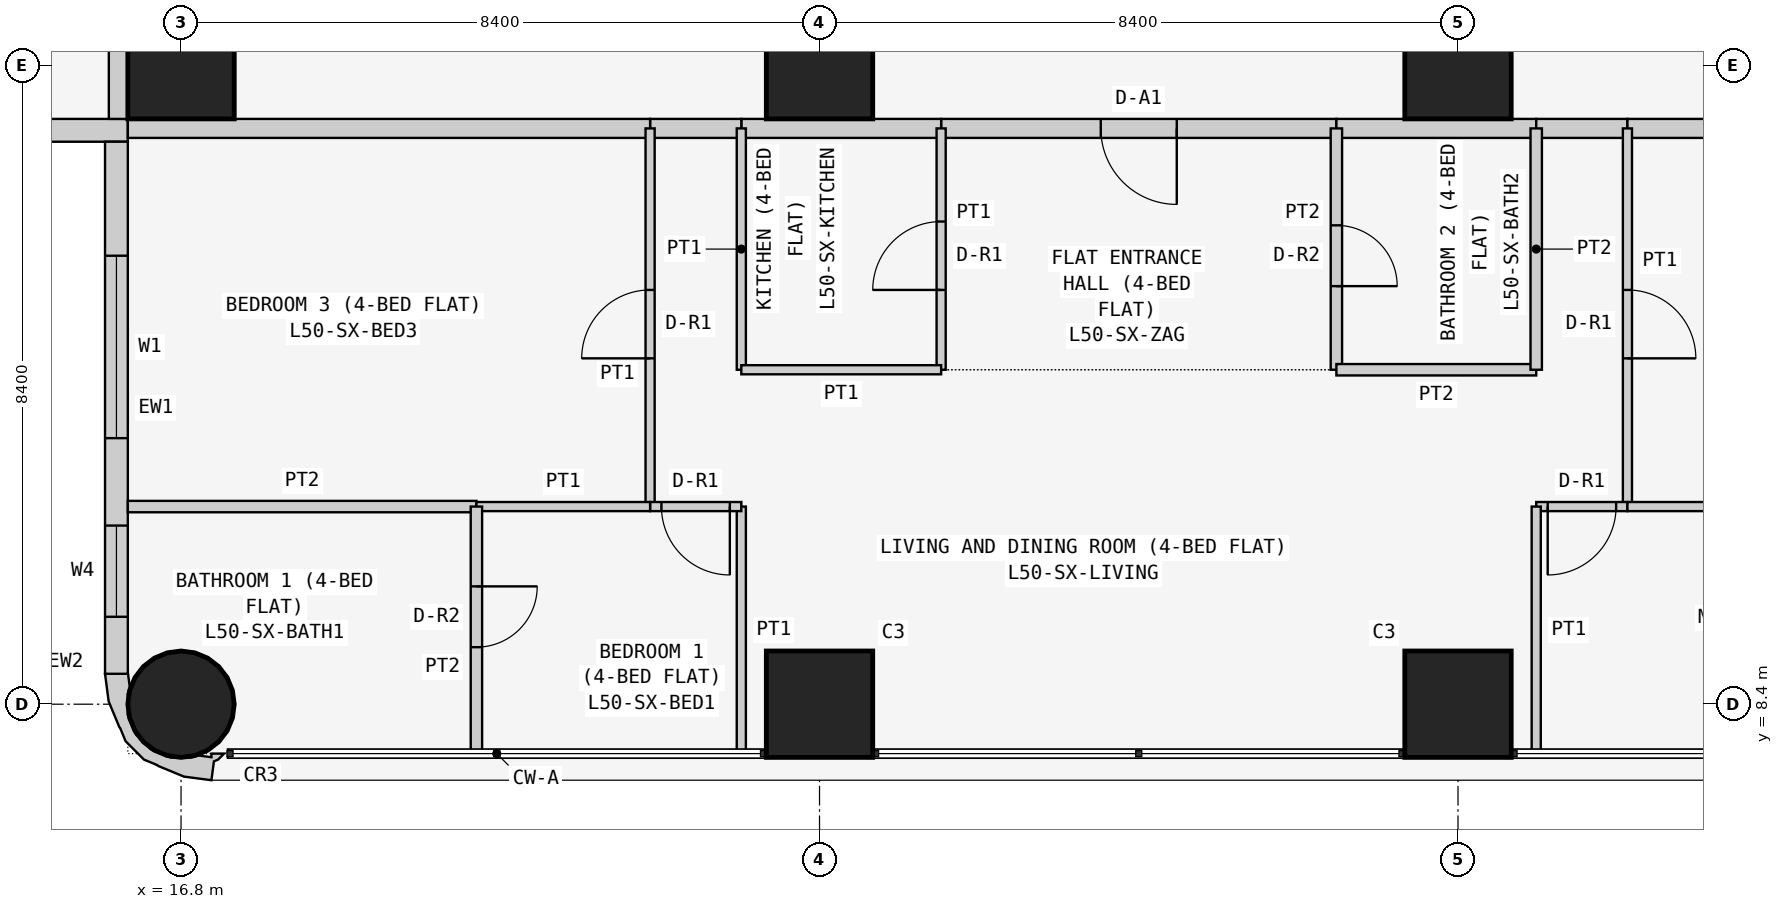
"""IFC4 building model, lengths in metres.
Left out: names, types, materials, properties, quantities, classifications, styles, units other than length and angle.
Written with IfcOpenShell. Run it as: python <this file> out.ifc"""

import sys

from ifc_helpers import new_model, si_unit, direction, frame, frame_2d, origin, origin_2d, place, context, subcontext, project, spatial, polyline, rectangle, circle, outline, extrude, element, fill, save


model = new_model("IFC4")
c1 = context("Model", 3, precision=1e-05, world=origin(), true_north=direction((0.0, 1.0)))
c2 = subcontext(c1, "Body", "Model", "MODEL_VIEW")
j1 = project(units=[si_unit("LENGTHUNIT", "METRE"), si_unit("PLANEANGLEUNIT", "RADIAN")], contexts=[c1])
p1 = place(None, origin())
s1 = spatial("IfcSite", under=j1, at=p1, CompositionType="ELEMENT")
p2 = place(p1, origin())
s2 = spatial("IfcBuilding", under=s1, at=p2, CompositionType="ELEMENT")
p3 = place(p2, frame((0.0, 0.0, 194.1)))
s3 = spatial("IfcBuildingStorey", under=s2, at=p3, CompositionType="ELEMENT", Elevation=194.1)
p4 = place(p3, frame((16.8, 8.4, 0.0), z_axis=(0.0, 0.0, 1.0), x_axis=(1.0, 0.0, 0.0)))
e1 = element("IfcColumn", 1, at=p4, inside=s3, PredefinedType="COLUMN", context=c2, shape_type="SweptSolid", body=[
    extrude(circle(Radius=0.7, at=origin_2d()), origin(), (0.0, 0.0, 1.0), 3.6),
])
for number, where, z_axis, x_axis in (
    (2, (16.8, 16.8, 0.0), (0.0, 0.0, 1.0), (1.0, 0.0, 0.0)),
    (3, (25.2, 8.4, 0.0), (0.0, 0.0, 1.0), (1.0, 0.0, 0.0)),
    (4, (25.2, 16.8, 0.0), (0.0, 0.0, 1.0), (1.0, 0.0, 0.0)),
    (5, (33.6, 8.4, 0.0), (0.0, 0.0, 1.0), (1.0, 0.0, 0.0)),
    (6, (33.6, 16.8, 0.0), (0.0, 0.0, 1.0), (1.0, 0.0, 0.0)),
):
    element("IfcColumn", number, at=place(p3, frame(where, z_axis=z_axis, x_axis=x_axis)), inside=s3, PredefinedType="COLUMN", context=c2, shape_type="SweptSolid", body=[
        extrude(rectangle(XDim=1.4, YDim=1.4, at=origin_2d()), origin(), (0.0, 0.0, 1.0), 3.6),
    ])
p5 = place(p3, frame((0.4, 15.95, 0.0), z_axis=(0.0, 0.0, 1.0), x_axis=(1.0, 0.0, 0.0)))
e7 = element("IfcWall", 7, at=p5, inside=s3, PredefinedType="SOLIDWALL", context=c2, shape_type="SweptSolid", body=[
    extrude(rectangle(XDim=15.7, YDim=0.3, at=frame_2d((7.85, 0.0))), origin(), (0.0, 0.0, 1.0), 3.45),
])
p6 = place(p5, frame((12.4, 0.0, 0.9)))
e8 = element("IfcOpeningElement", 8, at=p6, cuts=e7, PredefinedType="OPENING", context=c2, shape_type="SweptSolid", body=[
    extrude(rectangle(XDim=1.8, YDim=1.5, at=frame_2d((0.9, 0.75))), frame((0.0, 0.16, 0.0), z_axis=(0.0, -1.0, 0.0), x_axis=(1.0, 0.0, 0.0)), (0.0, 0.0, 1.0), 0.32),
])
p7 = place(p5, frame((9.55, 0.0, 1.5)))
e9 = element("IfcOpeningElement", 9, at=p7, cuts=e7, PredefinedType="OPENING", context=c2, shape_type="SweptSolid", body=[
    extrude(rectangle(XDim=0.9, YDim=0.7, at=frame_2d((0.45, 0.35))), frame((0.0, 0.16, 0.0), z_axis=(0.0, -1.0, 0.0), x_axis=(1.0, 0.0, 0.0)), (0.0, 0.0, 1.0), 0.32),
])
p8 = place(p5, frame((5.1, 0.0, 0.9)))
e10 = element("IfcOpeningElement", 10, at=p8, cuts=e7, PredefinedType="OPENING", context=c2, shape_type="SweptSolid", body=[
    extrude(rectangle(XDim=1.8, YDim=1.5, at=frame_2d((0.9, 0.75))), frame((0.0, 0.16, 0.0), z_axis=(0.0, -1.0, 0.0), x_axis=(1.0, 0.0, 0.0)), (0.0, 0.0, 1.0), 0.32),
])
p9 = place(p5, frame((2.0, 0.0, 0.0)))
e11 = element("IfcOpeningElement", 11, at=p9, cuts=e7, PredefinedType="OPENING", context=c2, shape_type="SweptSolid", body=[
    extrude(rectangle(XDim=0.9, YDim=2.4, at=frame_2d((0.45, 1.2))), frame((0.0, 0.16, 0.0), z_axis=(0.0, -1.0, 0.0), x_axis=(1.0, 0.0, 0.0)), (0.0, 0.0, 1.0), 0.32),
])
p10 = place(p5, frame((0.7, 0.0, 0.9)))
e12 = element("IfcOpeningElement", 12, at=p10, cuts=e7, PredefinedType="OPENING", context=c2, shape_type="SweptSolid", body=[
    extrude(rectangle(XDim=1.2, YDim=1.5, at=frame_2d((0.6, 0.75))), frame((0.0, 0.16, 0.0), z_axis=(0.0, -1.0, 0.0), x_axis=(1.0, 0.0, 0.0)), (0.0, 0.0, 1.0), 0.32),
])
p11 = place(p3, frame((15.95, 15.8, 0.0), z_axis=(0.0, 0.0, 1.0), x_axis=(0.0, -1.0, 0.0)))
e13 = element("IfcWall", 13, at=p11, inside=s3, PredefinedType="SOLIDWALL", context=c2, shape_type="SweptSolid", body=[
    extrude(rectangle(XDim=7.0, YDim=0.3, at=frame_2d((3.5, 0.0))), origin(), (0.0, 0.0, 1.0), 3.45),
])
p12 = place(p11, frame((1.5, 0.0, 0.9)))
e14 = element("IfcOpeningElement", 14, at=p12, cuts=e13, PredefinedType="OPENING", context=c2, shape_type="SweptSolid", body=[
    extrude(rectangle(XDim=2.4, YDim=1.5, at=frame_2d((1.2, 0.75))), frame((0.0, 0.16, 0.0), z_axis=(0.0, -1.0, 0.0), x_axis=(1.0, 0.0, 0.0)), (0.0, 0.0, 1.0), 0.32),
])
p13 = place(p11, frame((5.05, 0.0, 0.9)))
e15 = element("IfcOpeningElement", 15, at=p13, cuts=e13, PredefinedType="OPENING", context=c2, shape_type="SweptSolid", body=[
    extrude(rectangle(XDim=1.2, YDim=1.5, at=frame_2d((0.6, 0.75))), frame((0.0, 0.16, 0.0), z_axis=(0.0, -1.0, 0.0), x_axis=(1.0, 0.0, 0.0)), (0.0, 0.0, 1.0), 0.32),
])
p14 = place(p3, frame((16.076, 8.69, 0.0), z_axis=(0.0, 0.0, 1.0), x_axis=(-0.439933741929, -0.898030234854, 0.0)))
e16 = element("IfcWall", 16, at=p14, inside=s3, PredefinedType="SOLIDWALL", context=c2, shape_type="SweptSolid", body=[
    extrude(outline(polyline([(0.664, 1.577), (0.426, 1.497), (0.382, 1.536), (0.276, 1.572), (0.349, 1.423), (0.392, 1.444), (0.453, 1.261), (0.51, 1.211), (0.632, 0.961), (0.65, 0.683), (0.56, 0.419), (0.375, 0.21), (0.125, 0.087), (0.05, 0.082), (-0.127, -0.035), (-0.145, -0.044), (0.022, -0.296), (0.327, -0.094), (0.568, 0.18), (0.578, 0.199), (0.7, 0.337), (0.811, 0.661), (0.799, 0.846), (0.803, 0.866), (0.78, 1.231), (0.664, 1.577)])), origin(), (0.0, 0.0, 1.0), 3.45),
])
p15 = place(p3, frame((32.0, 15.975, 0.0), z_axis=(0.0, 0.0, 1.0), x_axis=(-1.0, 0.0, 0.0)))
e17 = element("IfcWall", 17, at=p15, inside=s3, PredefinedType="PARTITIONING", context=c2, shape_type="SweptSolid", body=[
    extrude(rectangle(XDim=5.2, YDim=0.25, at=frame_2d((2.6, 0.0))), origin(), (0.0, 0.0, 1.0), 3.45),
])
p16 = place(p15, frame((2.1, 0.0, 0.0)))
e18 = element("IfcOpeningElement", 18, at=p16, cuts=e17, PredefinedType="OPENING", context=c2, shape_type="SweptSolid", body=[
    extrude(rectangle(XDim=1.0, YDim=2.1, at=frame_2d((0.5, 1.05))), frame((0.0, 0.135, 0.0), z_axis=(0.0, -1.0, 0.0), x_axis=(1.0, 0.0, 0.0)), (0.0, 0.0, 1.0), 0.27),
])
p17 = place(p3, frame((34.629, 15.975, 0.0), z_axis=(0.0, 0.0, 1.0), x_axis=(-1.0, 0.0, 0.0)))
e19 = element("IfcWall", 19, at=p17, inside=s3, PredefinedType="PARTITIONING", context=c2, shape_type="SweptSolid", body=[
    extrude(rectangle(XDim=2.629, YDim=0.25, at=frame_2d((1.314, 0.0))), origin(), (0.0, 0.0, 1.0), 3.45),
])
p18 = place(p3, frame((26.8, 15.975, 0.0), z_axis=(0.0, 0.0, 1.0), x_axis=(-1.0, 0.0, 0.0)))
e20 = element("IfcWall", 20, at=p18, inside=s3, PredefinedType="PARTITIONING", context=c2, shape_type="SweptSolid", body=[
    extrude(rectangle(XDim=2.629, YDim=0.25, at=frame_2d((1.314, 0.0))), origin(), (0.0, 0.0, 1.0), 3.45),
])
p19 = place(p3, frame((24.171, 15.975, 0.0), z_axis=(0.0, 0.0, 1.0), x_axis=(-1.0, 0.0, 0.0)))
e21 = element("IfcWall", 21, at=p19, inside=s3, PredefinedType="PARTITIONING", context=c2, shape_type="SweptSolid", body=[
    extrude(rectangle(XDim=1.2, YDim=0.25, at=frame_2d((0.6, 0.0))), origin(), (0.0, 0.0, 1.0), 3.45),
])
p20 = place(p3, frame((35.829, 15.975, 0.0), z_axis=(0.0, 0.0, 1.0), x_axis=(-1.0, 0.0, 0.0)))
e22 = element("IfcWall", 22, at=p20, inside=s3, PredefinedType="PARTITIONING", context=c2, shape_type="SweptSolid", body=[
    extrude(rectangle(XDim=1.2, YDim=0.25, at=frame_2d((0.6, 0.0))), origin(), (0.0, 0.0, 1.0), 3.45),
])
for number, where, z_axis, x_axis in (
    (23, (42.7, 15.975, 0.0), (0.0, 0.0, 1.0), (-1.0, 0.0, 0.0)),
    (24, (22.971, 15.975, 0.0), (0.0, 0.0, 1.0), (-1.0, 0.0, 0.0)),
    (25, (15.975, 16.1, 0.0), (0.0, 0.0, 1.0), (0.0, 1.0, 0.0)),
):
    element("IfcWall", number, at=place(p3, frame(where, z_axis=z_axis, x_axis=x_axis)), inside=s3, PredefinedType="PARTITIONING", context=c2, shape_type="SweptSolid", body=[
        extrude(rectangle(XDim=6.871, YDim=0.25, at=frame_2d((3.436, 0.0))), origin(), (0.0, 0.0, 1.0), 3.45),
    ])
p21 = place(p3, frame((32.0, 12.8, 0.0), z_axis=(0.0, 0.0, 1.0), x_axis=(0.0, 1.0, 0.0)))
e26 = element("IfcWall", 26, at=p21, inside=s3, PredefinedType="PARTITIONING", context=c2, shape_type="SweptSolid", body=[
    extrude(rectangle(XDim=3.175, YDim=0.15, at=frame_2d((1.587, 0.0))), origin(), (0.0, 0.0, 1.0), 3.45),
])
p22 = place(p21, frame((1.1, 0.0, 0.0)))
e27 = element("IfcOpeningElement", 27, at=p22, cuts=e26, PredefinedType="OPENING", context=c2, shape_type="SweptSolid", body=[
    extrude(rectangle(XDim=0.8, YDim=2.1, at=frame_2d((0.4, 1.05))), frame((0.0, 0.085, 0.0), z_axis=(0.0, -1.0, 0.0), x_axis=(1.0, 0.0, 0.0)), (0.0, 0.0, 1.0), 0.17),
])
p23 = place(p3, frame((26.8, 15.975, 0.0), z_axis=(0.0, 0.0, 1.0), x_axis=(0.0, -1.0, 0.0)))
e28 = element("IfcWall", 28, at=p23, inside=s3, PredefinedType="PARTITIONING", context=c2, shape_type="SweptSolid", body=[
    extrude(rectangle(XDim=3.175, YDim=0.12, at=frame_2d((1.587, 0.0))), origin(), (0.0, 0.0, 1.0), 3.45),
])
p24 = place(p23, frame((1.225, 0.0, 0.0)))
e29 = element("IfcOpeningElement", 29, at=p24, cuts=e28, PredefinedType="OPENING", context=c2, shape_type="SweptSolid", body=[
    extrude(rectangle(XDim=0.9, YDim=2.1, at=frame_2d((0.45, 1.05))), frame((0.0, 0.07, 0.0), z_axis=(0.0, -1.0, 0.0), x_axis=(1.0, 0.0, 0.0)), (0.0, 0.0, 1.0), 0.14),
])
p25 = place(p3, frame((32.0, 12.8, 0.0), z_axis=(0.0, 0.0, 1.0), x_axis=(1.0, 0.0, 0.0)))
e30 = element("IfcWall", 30, at=p25, inside=s3, PredefinedType="PARTITIONING", context=c2, shape_type="SweptSolid", body=[
    extrude(rectangle(XDim=2.629, YDim=0.15, at=frame_2d((1.314, 0.0))), origin(), (0.0, 0.0, 1.0), 3.45),
])
p26 = place(p3, frame((34.629, 12.8, 0.0), z_axis=(0.0, 0.0, 1.0), x_axis=(0.0, 1.0, 0.0)))
e31 = element("IfcWall", 31, at=p26, inside=s3, PredefinedType="PARTITIONING", context=c2, shape_type="SweptSolid", body=[
    extrude(rectangle(XDim=3.175, YDim=0.15, at=frame_2d((1.587, 0.0))), origin(), (0.0, 0.0, 1.0), 3.45),
])
p27 = place(p3, frame((24.171, 15.975, 0.0), z_axis=(0.0, 0.0, 1.0), x_axis=(0.0, -1.0, 0.0)))
e32 = element("IfcWall", 32, at=p27, inside=s3, PredefinedType="PARTITIONING", context=c2, shape_type="SweptSolid", body=[
    extrude(rectangle(XDim=3.175, YDim=0.12, at=frame_2d((1.587, 0.0))), origin(), (0.0, 0.0, 1.0), 3.45),
])
p28 = place(p3, frame((24.171, 12.8, 0.0), z_axis=(0.0, 0.0, 1.0), x_axis=(1.0, 0.0, 0.0)))
e33 = element("IfcWall", 33, at=p28, inside=s3, PredefinedType="PARTITIONING", context=c2, shape_type="SweptSolid", body=[
    extrude(rectangle(XDim=2.629, YDim=0.12, at=frame_2d((1.314, 0.0))), origin(), (0.0, 0.0, 1.0), 3.45),
])
p29 = place(p3, frame((35.829, 15.975, 0.0), z_axis=(0.0, 0.0, 1.0), x_axis=(0.0, -1.0, 0.0)))
e34 = element("IfcWall", 34, at=p29, inside=s3, PredefinedType="PARTITIONING", context=c2, shape_type="SweptSolid", body=[
    extrude(rectangle(XDim=4.975, YDim=0.12, at=frame_2d((2.488, 0.0))), origin(), (0.0, 0.0, 1.0), 3.45),
])
p30 = place(p29, frame((2.125, 0.0, 0.0)))
e35 = element("IfcOpeningElement", 35, at=p30, cuts=e34, PredefinedType="OPENING", context=c2, shape_type="SweptSolid", body=[
    extrude(rectangle(XDim=0.9, YDim=2.1, at=frame_2d((0.45, 1.05))), frame((0.0, 0.07, 0.0), z_axis=(0.0, -1.0, 0.0), x_axis=(1.0, 0.0, 0.0)), (0.0, 0.0, 1.0), 0.14),
])
p31 = place(p3, frame((35.829, 11.0, 0.0), z_axis=(0.0, 0.0, 1.0), x_axis=(-1.0, 0.0, 0.0)))
e36 = element("IfcWall", 36, at=p31, inside=s3, PredefinedType="PARTITIONING", context=c2, shape_type="SweptSolid", body=[
    extrude(rectangle(XDim=1.2, YDim=0.12, at=frame_2d((0.6, 0.0))), origin(), (0.0, 0.0, 1.0), 3.45),
])
p32 = place(p31, frame((0.149, 0.0, 0.0)))
e37 = element("IfcOpeningElement", 37, at=p32, cuts=e36, PredefinedType="OPENING", context=c2, shape_type="SweptSolid", body=[
    extrude(rectangle(XDim=0.9, YDim=2.1, at=frame_2d((0.45, 1.05))), frame((0.0, 0.07, 0.0), z_axis=(0.0, -1.0, 0.0), x_axis=(1.0, 0.0, 0.0)), (0.0, 0.0, 1.0), 0.14),
])
p33 = place(p3, frame((34.629, 11.0, 0.0), z_axis=(0.0, 0.0, 1.0), x_axis=(0.0, -1.0, 0.0)))
e38 = element("IfcWall", 38, at=p33, inside=s3, PredefinedType="PARTITIONING", context=c2, shape_type="SweptSolid", body=[
    extrude(rectangle(XDim=3.25, YDim=0.12, at=frame_2d((1.625, 0.0))), origin(), (0.0, 0.0, 1.0), 3.45),
])
p34 = place(p3, frame((22.971, 11.0, 0.0), z_axis=(0.0, 0.0, 1.0), x_axis=(0.0, 1.0, 0.0)))
e39 = element("IfcWall", 39, at=p34, inside=s3, PredefinedType="PARTITIONING", context=c2, shape_type="SweptSolid", body=[
    extrude(rectangle(XDim=4.975, YDim=0.12, at=frame_2d((2.488, 0.0))), origin(), (0.0, 0.0, 1.0), 3.45),
])
p35 = place(p34, frame((1.95, 0.0, 0.0)))
e40 = element("IfcOpeningElement", 40, at=p35, cuts=e39, PredefinedType="OPENING", context=c2, shape_type="SweptSolid", body=[
    extrude(rectangle(XDim=0.9, YDim=2.1, at=frame_2d((0.45, 1.05))), frame((0.0, 0.07, 0.0), z_axis=(0.0, -1.0, 0.0), x_axis=(1.0, 0.0, 0.0)), (0.0, 0.0, 1.0), 0.14),
])
p36 = place(p3, frame((24.171, 7.75, 0.0), z_axis=(0.0, 0.0, 1.0), x_axis=(0.0, 1.0, 0.0)))
e41 = element("IfcWall", 41, at=p36, inside=s3, PredefinedType="PARTITIONING", context=c2, shape_type="SweptSolid", body=[
    extrude(rectangle(XDim=3.25, YDim=0.12, at=frame_2d((1.625, 0.0))), origin(), (0.0, 0.0, 1.0), 3.45),
])
p37 = place(p3, frame((24.171, 11.0, 0.0), z_axis=(0.0, 0.0, 1.0), x_axis=(-1.0, 0.0, 0.0)))
e42 = element("IfcWall", 42, at=p37, inside=s3, PredefinedType="PARTITIONING", context=c2, shape_type="SweptSolid", body=[
    extrude(rectangle(XDim=1.2, YDim=0.12, at=frame_2d((0.6, 0.0))), origin(), (0.0, 0.0, 1.0), 3.45),
])
p38 = place(p37, frame((0.151, 0.0, 0.0)))
e43 = element("IfcOpeningElement", 43, at=p38, cuts=e42, PredefinedType="OPENING", context=c2, shape_type="SweptSolid", body=[
    extrude(rectangle(XDim=0.9, YDim=2.1, at=frame_2d((0.45, 1.05))), frame((0.0, 0.07, 0.0), z_axis=(0.0, -1.0, 0.0), x_axis=(1.0, 0.0, 0.0)), (0.0, 0.0, 1.0), 0.14),
])
p39 = place(p3, frame((35.829, 11.0, 0.0), z_axis=(0.0, 0.0, 1.0), x_axis=(1.0, 0.0, 0.0)))
e44 = element("IfcWall", 44, at=p39, inside=s3, PredefinedType="PARTITIONING", context=c2, shape_type="SweptSolid", body=[
    extrude(rectangle(XDim=6.871, YDim=0.12, at=frame_2d((3.436, 0.0))), origin(), (0.0, 0.0, 1.0), 3.45),
])
p40 = place(p3, frame((16.1, 11.0, 0.0), z_axis=(0.0, 0.0, 1.0), x_axis=(1.0, 0.0, 0.0)))
e45 = element("IfcWall", 45, at=p40, inside=s3, PredefinedType="PARTITIONING", context=c2, shape_type="SweptSolid", body=[
    extrude(rectangle(XDim=4.586, YDim=0.15, at=frame_2d((2.293, 0.0))), origin(), (0.0, 0.0, 1.0), 3.45),
])
p41 = place(p3, frame((20.686, 11.0, 0.0), z_axis=(0.0, 0.0, 1.0), x_axis=(1.0, 0.0, 0.0)))
e46 = element("IfcWall", 46, at=p41, inside=s3, PredefinedType="PARTITIONING", context=c2, shape_type="SweptSolid", body=[
    extrude(rectangle(XDim=2.285, YDim=0.12, at=frame_2d((1.143, 0.0))), origin(), (0.0, 0.0, 1.0), 3.45),
])
p42 = place(p3, frame((20.686, 7.75, 0.0), z_axis=(0.0, 0.0, 1.0), x_axis=(0.0, 1.0, 0.0)))
e47 = element("IfcWall", 47, at=p42, inside=s3, PredefinedType="PARTITIONING", context=c2, shape_type="SweptSolid", body=[
    extrude(rectangle(XDim=3.25, YDim=0.15, at=frame_2d((1.625, 0.0))), origin(), (0.0, 0.0, 1.0), 3.45),
])
p43 = place(p42, frame((1.4, 0.0, 0.0)))
e48 = element("IfcOpeningElement", 48, at=p43, cuts=e47, PredefinedType="OPENING", context=c2, shape_type="SweptSolid", body=[
    extrude(rectangle(XDim=0.8, YDim=2.1, at=frame_2d((0.4, 1.05))), frame((0.0, 0.085, 0.0), z_axis=(0.0, -1.0, 0.0), x_axis=(1.0, 0.0, 0.0)), (0.0, 0.0, 1.0), 0.17),
])
p44 = place(p12, origin())
e49 = element("IfcWindow", 49, at=p44, inside=s3, PartitioningType="SINGLE_PANEL", PredefinedType="WINDOW", context=c2, shape_type="SweptSolid", body=[
    extrude(rectangle(XDim=2.4, YDim=1.5, at=frame_2d((1.2, 0.75))), frame((0.0, 0.03, 0.0), z_axis=(0.0, -1.0, 0.0), x_axis=(1.0, 0.0, 0.0)), (0.0, 0.0, 1.0), 0.06),
])
fill(e14, e49)
p45 = place(p13, origin())
e50 = element("IfcWindow", 50, at=p45, inside=s3, PartitioningType="SINGLE_PANEL", PredefinedType="WINDOW", context=c2, shape_type="SweptSolid", body=[
    extrude(rectangle(XDim=1.2, YDim=1.5, at=frame_2d((0.6, 0.75))), frame((0.0, 0.03, 0.0), z_axis=(0.0, -1.0, 0.0), x_axis=(1.0, 0.0, 0.0)), (0.0, 0.0, 1.0), 0.06),
])
fill(e15, e50)
p46 = place(p16, origin())
e51 = element("IfcDoor", 51, at=p46, inside=s3, OperationType="SINGLE_SWING_LEFT", PredefinedType="DOOR", context=c2, shape_type="SweptSolid", body=[
    extrude(rectangle(XDim=1.0, YDim=2.1, at=frame_2d((0.5, 1.05))), frame((0.0, 0.025, 0.0), z_axis=(0.0, -1.0, 0.0), x_axis=(1.0, 0.0, 0.0)), (0.0, 0.0, 1.0), 0.05),
])
fill(e18, e51)
p47 = place(p22, frame((0.8, 0.0, 0.0), z_axis=(0.0, 0.0, 1.0), x_axis=(-1.0, 0.0, 0.0)))
e52 = element("IfcDoor", 52, at=p47, inside=s3, OperationType="SINGLE_SWING_RIGHT", PredefinedType="DOOR", context=c2, shape_type="SweptSolid", body=[
    extrude(rectangle(XDim=0.8, YDim=2.1, at=frame_2d((0.4, 1.05))), frame((0.0, 0.025, 0.0), z_axis=(0.0, -1.0, 0.0), x_axis=(1.0, 0.0, 0.0)), (0.0, 0.0, 1.0), 0.05),
])
fill(e27, e52)
p48 = place(p24, frame((0.9, 0.0, 0.0), z_axis=(0.0, 0.0, 1.0), x_axis=(-1.0, 0.0, 0.0)))
e53 = element("IfcDoor", 53, at=p48, inside=s3, OperationType="SINGLE_SWING_LEFT", PredefinedType="DOOR", context=c2, shape_type="SweptSolid", body=[
    extrude(rectangle(XDim=0.9, YDim=2.1, at=frame_2d((0.45, 1.05))), frame((0.0, 0.025, 0.0), z_axis=(0.0, -1.0, 0.0), x_axis=(1.0, 0.0, 0.0)), (0.0, 0.0, 1.0), 0.05),
])
fill(e29, e53)
p49 = place(p30, origin())
e54 = element("IfcDoor", 54, at=p49, inside=s3, OperationType="SINGLE_SWING_RIGHT", PredefinedType="DOOR", context=c2, shape_type="SweptSolid", body=[
    extrude(rectangle(XDim=0.9, YDim=2.1, at=frame_2d((0.45, 1.05))), frame((0.0, 0.025, 0.0), z_axis=(0.0, -1.0, 0.0), x_axis=(1.0, 0.0, 0.0)), (0.0, 0.0, 1.0), 0.05),
])
fill(e35, e54)
p50 = place(p32, origin())
e55 = element("IfcDoor", 55, at=p50, inside=s3, OperationType="SINGLE_SWING_RIGHT", PredefinedType="DOOR", context=c2, shape_type="SweptSolid", body=[
    extrude(rectangle(XDim=0.9, YDim=2.1, at=frame_2d((0.45, 1.05))), frame((0.0, 0.025, 0.0), z_axis=(0.0, -1.0, 0.0), x_axis=(1.0, 0.0, 0.0)), (0.0, 0.0, 1.0), 0.05),
])
fill(e37, e55)
p51 = place(p35, origin())
e56 = element("IfcDoor", 56, at=p51, inside=s3, OperationType="SINGLE_SWING_LEFT", PredefinedType="DOOR", context=c2, shape_type="SweptSolid", body=[
    extrude(rectangle(XDim=0.9, YDim=2.1, at=frame_2d((0.45, 1.05))), frame((0.0, 0.025, 0.0), z_axis=(0.0, -1.0, 0.0), x_axis=(1.0, 0.0, 0.0)), (0.0, 0.0, 1.0), 0.05),
])
fill(e40, e56)
p52 = place(p38, origin())
e57 = element("IfcDoor", 57, at=p52, inside=s3, OperationType="SINGLE_SWING_LEFT", PredefinedType="DOOR", context=c2, shape_type="SweptSolid", body=[
    extrude(rectangle(XDim=0.9, YDim=2.1, at=frame_2d((0.45, 1.05))), frame((0.0, 0.025, 0.0), z_axis=(0.0, -1.0, 0.0), x_axis=(1.0, 0.0, 0.0)), (0.0, 0.0, 1.0), 0.05),
])
fill(e43, e57)
p53 = place(p43, frame((0.8, 0.0, 0.0), z_axis=(0.0, 0.0, 1.0), x_axis=(-1.0, 0.0, 0.0)))
e58 = element("IfcDoor", 58, at=p53, inside=s3, OperationType="SINGLE_SWING_LEFT", PredefinedType="DOOR", context=c2, shape_type="SweptSolid", body=[
    extrude(rectangle(XDim=0.8, YDim=2.1, at=frame_2d((0.4, 1.05))), frame((0.0, 0.025, 0.0), z_axis=(0.0, -1.0, 0.0), x_axis=(1.0, 0.0, 0.0)), (0.0, 0.0, 1.0), 0.05),
])
fill(e48, e58)
save(model, sys.argv[1])
